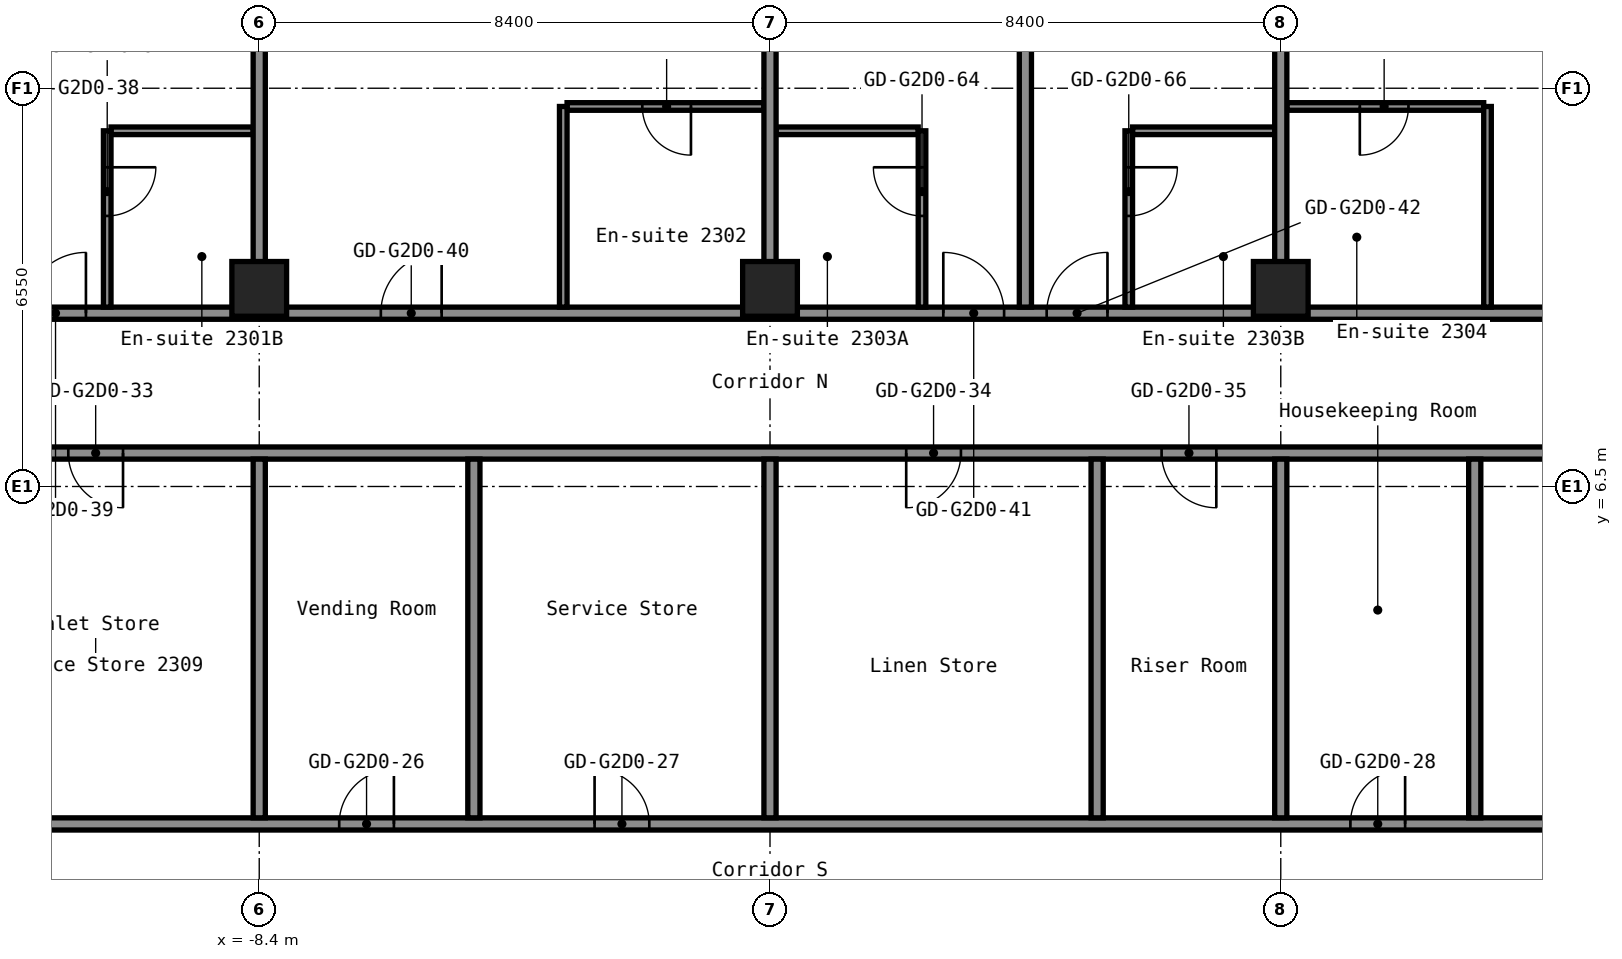
"""IFC4 building model, lengths in metres.
Left out: names, types, materials, properties, quantities, classifications, styles, units other than length and angle.
Written with IfcOpenShell. Run it as: python <this file> out.ifc"""

import sys

from ifc_helpers import new_model, si_unit, direction, frame, frame_2d, origin, origin_2d, place, context, subcontext, project, spatial, rectangle, hollow_rectangle, extrude, element, fill, save


model = new_model("IFC4")
c1 = context("Model", 3, precision=1e-05, world=origin(), true_north=direction((0.0, 1.0)))
c2 = subcontext(c1, "Body", "Model", "MODEL_VIEW")
j1 = project(units=[si_unit("LENGTHUNIT", "METRE"), si_unit("PLANEANGLEUNIT", "RADIAN")], contexts=[c1])
p1 = place(None, origin())
s1 = spatial("IfcSite", under=j1, at=p1, CompositionType="ELEMENT")
p2 = place(p1, origin())
s2 = spatial("IfcBuilding", under=s1, at=p2, CompositionType="ELEMENT")
p3 = place(p2, frame((0.0, 0.0, 85.0)))
s3 = spatial("IfcBuildingStorey", under=s2, at=p3, CompositionType="ELEMENT", Elevation=85.0)
for number, where, z_axis, x_axis in (
    (1, (-8.4, 9.75, 0.0), (0.0, 0.0, 1.0), (1.0, 0.0, 0.0)),
    (2, (0.0, 9.75, 0.0), (0.0, 0.0, 1.0), (1.0, 0.0, 0.0)),
    (3, (8.4, 9.75, 0.0), (0.0, 0.0, 1.0), (1.0, 0.0, 0.0)),
):
    element("IfcColumn", number, at=place(p3, frame(where, z_axis=z_axis, x_axis=x_axis)), inside=s3, PredefinedType="COLUMN", context=c2, shape_type="SweptSolid", body=[
        extrude(hollow_rectangle(XDim=0.9, YDim=0.9, WallThickness=0.036, at=origin_2d()), origin(), (0.0, 0.0, 1.0), 2.8),
    ])
p4 = place(p3, frame((-16.8, 0.95, 0.0), z_axis=(0.0, 0.0, 1.0), x_axis=(1.0, 0.0, 0.0)))
e4 = element("IfcWall", 4, at=p4, inside=s3, PredefinedType="PARTITIONING", context=c2, shape_type="SweptSolid", body=[
    extrude(rectangle(XDim=33.6, YDim=0.2, at=frame_2d((16.8, 0.0))), origin(), (0.0, 0.0, 1.0), 2.8),
])
p5 = place(p4, frame((9.715, 0.0, 0.0)))
e5 = element("IfcOpeningElement", 5, at=p5, cuts=e4, PredefinedType="OPENING", context=c2, shape_type="SweptSolid", body=[
    extrude(rectangle(XDim=0.9, YDim=2.1, at=frame_2d((0.45, 1.05))), frame((0.0, 0.11, 0.0), z_axis=(0.0, -1.0, 0.0), x_axis=(1.0, 0.0, 0.0)), (0.0, 0.0, 1.0), 0.22),
])
p6 = place(p4, frame((13.915, 0.0, 0.0)))
e6 = element("IfcOpeningElement", 6, at=p6, cuts=e4, PredefinedType="OPENING", context=c2, shape_type="SweptSolid", body=[
    extrude(rectangle(XDim=0.9, YDim=2.1, at=frame_2d((0.45, 1.05))), frame((0.0, 0.11, 0.0), z_axis=(0.0, -1.0, 0.0), x_axis=(1.0, 0.0, 0.0)), (0.0, 0.0, 1.0), 0.22),
])
p7 = place(p4, frame((26.345, 0.0, 0.0)))
e7 = element("IfcOpeningElement", 7, at=p7, cuts=e4, PredefinedType="OPENING", context=c2, shape_type="SweptSolid", body=[
    extrude(rectangle(XDim=0.9, YDim=2.1, at=frame_2d((0.45, 1.05))), frame((0.0, 0.11, 0.0), z_axis=(0.0, -1.0, 0.0), x_axis=(1.0, 0.0, 0.0)), (0.0, 0.0, 1.0), 0.22),
])
p8 = place(p4, frame((30.545, 0.0, 0.0)))
e8 = element("IfcOpeningElement", 8, at=p8, cuts=e4, PredefinedType="OPENING", context=c2, shape_type="SweptSolid", body=[
    extrude(rectangle(XDim=0.9, YDim=2.1, at=frame_2d((0.45, 1.05))), frame((0.0, 0.11, 0.0), z_axis=(0.0, -1.0, 0.0), x_axis=(1.0, 0.0, 0.0)), (0.0, 0.0, 1.0), 0.22),
])
p9 = place(p3, frame((-16.8, 7.05, 0.0), z_axis=(0.0, 0.0, 1.0), x_axis=(1.0, 0.0, 0.0)))
e9 = element("IfcWall", 9, at=p9, inside=s3, PredefinedType="PARTITIONING", context=c2, shape_type="SweptSolid", body=[
    extrude(rectangle(XDim=33.6, YDim=0.2, at=frame_2d((16.8, 0.0))), origin(), (0.0, 0.0, 1.0), 2.8),
])
p10 = place(p9, frame((1.06, 0.0, 0.0)))
e10 = element("IfcOpeningElement", 10, at=p10, cuts=e9, PredefinedType="OPENING", context=c2, shape_type="SweptSolid", body=[
    extrude(rectangle(XDim=0.9, YDim=2.1, at=frame_2d((0.45, 1.05))), frame((0.0, 0.11, 0.0), z_axis=(0.0, -1.0, 0.0), x_axis=(1.0, 0.0, 0.0)), (0.0, 0.0, 1.0), 0.22),
])
p11 = place(p9, frame((5.26, 0.0, 0.0)))
e11 = element("IfcOpeningElement", 11, at=p11, cuts=e9, PredefinedType="OPENING", context=c2, shape_type="SweptSolid", body=[
    extrude(rectangle(XDim=0.9, YDim=2.1, at=frame_2d((0.45, 1.05))), frame((0.0, 0.11, 0.0), z_axis=(0.0, -1.0, 0.0), x_axis=(1.0, 0.0, 0.0)), (0.0, 0.0, 1.0), 0.22),
])
p12 = place(p9, frame((19.04, 0.0, 0.0)))
e12 = element("IfcOpeningElement", 12, at=p12, cuts=e9, PredefinedType="OPENING", context=c2, shape_type="SweptSolid", body=[
    extrude(rectangle(XDim=0.9, YDim=2.1, at=frame_2d((0.45, 1.05))), frame((0.0, 0.11, 0.0), z_axis=(0.0, -1.0, 0.0), x_axis=(1.0, 0.0, 0.0)), (0.0, 0.0, 1.0), 0.22),
])
p13 = place(p9, frame((23.24, 0.0, 0.0)))
e13 = element("IfcOpeningElement", 13, at=p13, cuts=e9, PredefinedType="OPENING", context=c2, shape_type="SweptSolid", body=[
    extrude(rectangle(XDim=0.9, YDim=2.1, at=frame_2d((0.45, 1.05))), frame((0.0, 0.11, 0.0), z_axis=(0.0, -1.0, 0.0), x_axis=(1.0, 0.0, 0.0)), (0.0, 0.0, 1.0), 0.22),
])
p14 = place(p3, frame((-16.36, 9.35, 0.0), z_axis=(0.0, 0.0, 1.0), x_axis=(1.0, 0.0, 0.0)))
e14 = element("IfcWall", 14, at=p14, inside=s3, PredefinedType="PARTITIONING", context=c2, shape_type="SweptSolid", body=[
    extrude(rectangle(XDim=32.72, YDim=0.2, at=frame_2d((16.36, 0.0))), origin(), (0.0, 0.0, 1.0), 2.8),
])
p15 = place(p14, frame((2.41, 0.0, 0.0)))
e15 = element("IfcOpeningElement", 15, at=p15, cuts=e14, PredefinedType="OPENING", context=c2, shape_type="SweptSolid", body=[
    extrude(rectangle(XDim=1.0, YDim=2.1, at=frame_2d((0.5, 1.05))), frame((0.0, 0.11, 0.0), z_axis=(0.0, -1.0, 0.0), x_axis=(1.0, 0.0, 0.0)), (0.0, 0.0, 1.0), 0.22),
])
p16 = place(p14, frame((4.11, 0.0, 0.0)))
e16 = element("IfcOpeningElement", 16, at=p16, cuts=e14, PredefinedType="OPENING", context=c2, shape_type="SweptSolid", body=[
    extrude(rectangle(XDim=1.0, YDim=2.1, at=frame_2d((0.5, 1.05))), frame((0.0, 0.11, 0.0), z_axis=(0.0, -1.0, 0.0), x_axis=(1.0, 0.0, 0.0)), (0.0, 0.0, 1.0), 0.22),
])
p17 = place(p14, frame((9.96, 0.0, 0.0)))
e17 = element("IfcOpeningElement", 17, at=p17, cuts=e14, PredefinedType="OPENING", context=c2, shape_type="SweptSolid", body=[
    extrude(rectangle(XDim=1.0, YDim=2.1, at=frame_2d((0.5, 1.05))), frame((0.0, 0.11, 0.0), z_axis=(0.0, -1.0, 0.0), x_axis=(1.0, 0.0, 0.0)), (0.0, 0.0, 1.0), 0.22),
])
p18 = place(p14, frame((19.21, 0.0, 0.0)))
e18 = element("IfcOpeningElement", 18, at=p18, cuts=e14, PredefinedType="OPENING", context=c2, shape_type="SweptSolid", body=[
    extrude(rectangle(XDim=1.0, YDim=2.1, at=frame_2d((0.5, 1.05))), frame((0.0, 0.11, 0.0), z_axis=(0.0, -1.0, 0.0), x_axis=(1.0, 0.0, 0.0)), (0.0, 0.0, 1.0), 0.22),
])
p19 = place(p14, frame((20.91, 0.0, 0.0)))
e19 = element("IfcOpeningElement", 19, at=p19, cuts=e14, PredefinedType="OPENING", context=c2, shape_type="SweptSolid", body=[
    extrude(rectangle(XDim=1.0, YDim=2.1, at=frame_2d((0.5, 1.05))), frame((0.0, 0.11, 0.0), z_axis=(0.0, -1.0, 0.0), x_axis=(1.0, 0.0, 0.0)), (0.0, 0.0, 1.0), 0.22),
])
p20 = place(p14, frame((30.16, 0.0, 0.0)))
e20 = element("IfcOpeningElement", 20, at=p20, cuts=e14, PredefinedType="OPENING", context=c2, shape_type="SweptSolid", body=[
    extrude(rectangle(XDim=1.0, YDim=2.1, at=frame_2d((0.5, 1.05))), frame((0.0, 0.11, 0.0), z_axis=(0.0, -1.0, 0.0), x_axis=(1.0, 0.0, 0.0)), (0.0, 0.0, 1.0), 0.22),
])
for number, where, z_axis, x_axis in (
    (21, (-10.837, 12.35, 0.0), (0.0, 0.0, 1.0), (1.0, 0.0, 0.0)),
    (22, (0.1, 12.35, 0.0), (0.0, 0.0, 1.0), (1.0, 0.0, 0.0)),
):
    element("IfcWall", number, at=place(p3, frame(where, z_axis=z_axis, x_axis=x_axis)), inside=s3, PredefinedType="PARTITIONING", context=c2, shape_type="SweptSolid", body=[
        extrude(rectangle(XDim=2.337, YDim=0.125, at=frame_2d((1.169, 0.0))), origin(), (0.0, 0.0, 1.0), 2.8),
    ])
p21 = place(p3, frame((5.962, 12.35, 0.0), z_axis=(0.0, 0.0, 1.0), x_axis=(1.0, 0.0, 0.0)))
e23 = element("IfcWall", 23, at=p21, inside=s3, PredefinedType="PARTITIONING", context=c2, shape_type="SweptSolid", body=[
    extrude(rectangle(XDim=2.338, YDim=0.125, at=frame_2d((1.169, 0.0))), origin(), (0.0, 0.0, 1.0), 2.8),
])
p22 = place(p3, frame((-3.337, 12.75, 0.0), z_axis=(0.0, 0.0, 1.0), x_axis=(1.0, 0.0, 0.0)))
e24 = element("IfcWall", 24, at=p22, inside=s3, PredefinedType="PARTITIONING", context=c2, shape_type="SweptSolid", body=[
    extrude(rectangle(XDim=3.237, YDim=0.125, at=frame_2d((1.619, 0.0))), origin(), (0.0, 0.0, 1.0), 2.8),
])
p23 = place(p22, frame((1.238, 0.0, 0.0)))
e25 = element("IfcOpeningElement", 25, at=p23, cuts=e24, PredefinedType="OPENING", context=c2, shape_type="SweptSolid", body=[
    extrude(rectangle(XDim=0.8, YDim=2.1, at=frame_2d((0.4, 1.05))), frame((0.0, 0.073, 0.0), z_axis=(0.0, -1.0, 0.0), x_axis=(1.0, 0.0, 0.0)), (0.0, 0.0, 1.0), 0.145),
])
p24 = place(p3, frame((8.5, 12.75, 0.0), z_axis=(0.0, 0.0, 1.0), x_axis=(1.0, 0.0, 0.0)))
e26 = element("IfcWall", 26, at=p24, inside=s3, PredefinedType="PARTITIONING", context=c2, shape_type="SweptSolid", body=[
    extrude(rectangle(XDim=3.238, YDim=0.125, at=frame_2d((1.619, 0.0))), origin(), (0.0, 0.0, 1.0), 2.8),
])
p25 = place(p24, frame((1.2, 0.0, 0.0)))
e27 = element("IfcOpeningElement", 27, at=p25, cuts=e26, PredefinedType="OPENING", context=c2, shape_type="SweptSolid", body=[
    extrude(rectangle(XDim=0.8, YDim=2.1, at=frame_2d((0.4, 1.05))), frame((0.0, 0.073, 0.0), z_axis=(0.0, -1.0, 0.0), x_axis=(1.0, 0.0, 0.0)), (0.0, 0.0, 1.0), 0.145),
])
p26 = place(p3, frame((-10.9, 9.45, 0.0), z_axis=(0.0, 0.0, 1.0), x_axis=(0.0, 1.0, 0.0)))
e28 = element("IfcWall", 28, at=p26, inside=s3, PredefinedType="PARTITIONING", context=c2, shape_type="SweptSolid", body=[
    extrude(rectangle(XDim=2.9, YDim=0.125, at=frame_2d((1.45, 0.0))), origin(), (0.0, 0.0, 1.0), 2.8),
])
p27 = place(p26, frame((1.5, 0.0, 0.0)))
e29 = element("IfcOpeningElement", 29, at=p27, cuts=e28, PredefinedType="OPENING", context=c2, shape_type="SweptSolid", body=[
    extrude(rectangle(XDim=0.8, YDim=2.1, at=frame_2d((0.4, 1.05))), frame((0.0, 0.073, 0.0), z_axis=(0.0, -1.0, 0.0), x_axis=(1.0, 0.0, 0.0)), (0.0, 0.0, 1.0), 0.145),
])
p28 = place(p3, frame((-8.4, 1.05, 0.0), z_axis=(0.0, 0.0, 1.0), x_axis=(0.0, 1.0, 0.0)))
e30 = element("IfcWall", 30, at=p28, inside=s3, PredefinedType="PARTITIONING", context=c2, shape_type="SweptSolid", body=[
    extrude(rectangle(XDim=5.9, YDim=0.2, at=frame_2d((2.95, 0.0))), origin(), (0.0, 0.0, 1.0), 2.8),
])
p29 = place(p3, frame((-8.4, 10.19, 0.0), z_axis=(0.0, 0.0, 1.0), x_axis=(0.0, 1.0, 0.0)))
e31 = element("IfcWall", 31, at=p29, inside=s3, PredefinedType="PARTITIONING", context=c2, shape_type="SweptSolid", body=[
    extrude(rectangle(XDim=13.36, YDim=0.2, at=frame_2d((6.68, 0.0))), origin(), (0.0, 0.0, 1.0), 2.8),
])
p30 = place(p3, frame((-4.87, 1.05, 0.0), z_axis=(0.0, 0.0, 1.0), x_axis=(0.0, 1.0, 0.0)))
e32 = element("IfcWall", 32, at=p30, inside=s3, PredefinedType="PARTITIONING", context=c2, shape_type="SweptSolid", body=[
    extrude(rectangle(XDim=5.9, YDim=0.2, at=frame_2d((2.95, 0.0))), origin(), (0.0, 0.0, 1.0), 2.8),
])
p31 = place(p3, frame((-3.4, 9.45, 0.0), z_axis=(0.0, 0.0, 1.0), x_axis=(0.0, 1.0, 0.0)))
e33 = element("IfcWall", 33, at=p31, inside=s3, PredefinedType="PARTITIONING", context=c2, shape_type="SweptSolid", body=[
    extrude(rectangle(XDim=3.3, YDim=0.125, at=frame_2d((1.65, 0.0))), origin(), (0.0, 0.0, 1.0), 2.8),
])
p32 = place(p3, frame((0.0, 1.05, 0.0), z_axis=(0.0, 0.0, 1.0), x_axis=(0.0, 1.0, 0.0)))
e34 = element("IfcWall", 34, at=p32, inside=s3, PredefinedType="PARTITIONING", context=c2, shape_type="SweptSolid", body=[
    extrude(rectangle(XDim=5.9, YDim=0.2, at=frame_2d((2.95, 0.0))), origin(), (0.0, 0.0, 1.0), 2.8),
])
p33 = place(p3, frame((0.0, 10.19, 0.0), z_axis=(0.0, 0.0, 1.0), x_axis=(0.0, 1.0, 0.0)))
e35 = element("IfcWall", 35, at=p33, inside=s3, PredefinedType="PARTITIONING", context=c2, shape_type="SweptSolid", body=[
    extrude(rectangle(XDim=13.36, YDim=0.2, at=frame_2d((6.68, 0.0))), origin(), (0.0, 0.0, 1.0), 2.8),
])
p34 = place(p3, frame((2.5, 9.45, 0.0), z_axis=(0.0, 0.0, 1.0), x_axis=(0.0, 1.0, 0.0)))
e36 = element("IfcWall", 36, at=p34, inside=s3, PredefinedType="PARTITIONING", context=c2, shape_type="SweptSolid", body=[
    extrude(rectangle(XDim=2.9, YDim=0.125, at=frame_2d((1.45, 0.0))), origin(), (0.0, 0.0, 1.0), 2.8),
])
p35 = place(p34, frame((1.5, 0.0, 0.0)))
e37 = element("IfcOpeningElement", 37, at=p35, cuts=e36, PredefinedType="OPENING", context=c2, shape_type="SweptSolid", body=[
    extrude(rectangle(XDim=0.8, YDim=2.1, at=frame_2d((0.4, 1.05))), frame((0.0, 0.073, 0.0), z_axis=(0.0, -1.0, 0.0), x_axis=(1.0, 0.0, 0.0)), (0.0, 0.0, 1.0), 0.145),
])
p36 = place(p3, frame((4.2, 9.45, 0.0), z_axis=(0.0, 0.0, 1.0), x_axis=(0.0, 1.0, 0.0)))
e38 = element("IfcWall", 38, at=p36, inside=s3, PredefinedType="PARTITIONING", context=c2, shape_type="SweptSolid", body=[
    extrude(rectangle(XDim=14.1, YDim=0.2, at=frame_2d((7.05, 0.0))), origin(), (0.0, 0.0, 1.0), 2.8),
])
p37 = place(p3, frame((5.38, 1.05, 0.0), z_axis=(0.0, 0.0, 1.0), x_axis=(0.0, 1.0, 0.0)))
e39 = element("IfcWall", 39, at=p37, inside=s3, PredefinedType="PARTITIONING", context=c2, shape_type="SweptSolid", body=[
    extrude(rectangle(XDim=5.9, YDim=0.2, at=frame_2d((2.95, 0.0))), origin(), (0.0, 0.0, 1.0), 2.8),
])
p38 = place(p3, frame((5.9, 9.45, 0.0), z_axis=(0.0, 0.0, 1.0), x_axis=(0.0, 1.0, 0.0)))
e40 = element("IfcWall", 40, at=p38, inside=s3, PredefinedType="PARTITIONING", context=c2, shape_type="SweptSolid", body=[
    extrude(rectangle(XDim=2.9, YDim=0.125, at=frame_2d((1.45, 0.0))), origin(), (0.0, 0.0, 1.0), 2.8),
])
p39 = place(p38, frame((1.5, 0.0, 0.0)))
e41 = element("IfcOpeningElement", 41, at=p39, cuts=e40, PredefinedType="OPENING", context=c2, shape_type="SweptSolid", body=[
    extrude(rectangle(XDim=0.8, YDim=2.1, at=frame_2d((0.4, 1.05))), frame((0.0, 0.073, 0.0), z_axis=(0.0, -1.0, 0.0), x_axis=(1.0, 0.0, 0.0)), (0.0, 0.0, 1.0), 0.145),
])
p40 = place(p3, frame((8.4, 1.05, 0.0), z_axis=(0.0, 0.0, 1.0), x_axis=(0.0, 1.0, 0.0)))
e42 = element("IfcWall", 42, at=p40, inside=s3, PredefinedType="PARTITIONING", context=c2, shape_type="SweptSolid", body=[
    extrude(rectangle(XDim=5.9, YDim=0.2, at=frame_2d((2.95, 0.0))), origin(), (0.0, 0.0, 1.0), 2.8),
])
p41 = place(p3, frame((8.4, 10.19, 0.0), z_axis=(0.0, 0.0, 1.0), x_axis=(0.0, 1.0, 0.0)))
e43 = element("IfcWall", 43, at=p41, inside=s3, PredefinedType="PARTITIONING", context=c2, shape_type="SweptSolid", body=[
    extrude(rectangle(XDim=13.36, YDim=0.2, at=frame_2d((6.68, 0.0))), origin(), (0.0, 0.0, 1.0), 2.8),
])
p42 = place(p3, frame((11.59, 1.05, 0.0), z_axis=(0.0, 0.0, 1.0), x_axis=(0.0, 1.0, 0.0)))
e44 = element("IfcWall", 44, at=p42, inside=s3, PredefinedType="PARTITIONING", context=c2, shape_type="SweptSolid", body=[
    extrude(rectangle(XDim=5.9, YDim=0.2, at=frame_2d((2.95, 0.0))), origin(), (0.0, 0.0, 1.0), 2.8),
])
p43 = place(p3, frame((11.8, 9.45, 0.0), z_axis=(0.0, 0.0, 1.0), x_axis=(0.0, 1.0, 0.0)))
e45 = element("IfcWall", 45, at=p43, inside=s3, PredefinedType="PARTITIONING", context=c2, shape_type="SweptSolid", body=[
    extrude(rectangle(XDim=3.3, YDim=0.125, at=frame_2d((1.65, 0.0))), origin(), (0.0, 0.0, 1.0), 2.8),
])
p44 = place(p5, origin())
e46 = element("IfcDoor", 46, at=p44, inside=s3, OperationType="SINGLE_SWING_LEFT", PredefinedType="DOOR", context=c2, shape_type="SweptSolid", body=[
    extrude(rectangle(XDim=0.9, YDim=2.1, at=frame_2d((0.45, 1.05))), frame((0.0, 0.025, 0.0), z_axis=(0.0, -1.0, 0.0), x_axis=(1.0, 0.0, 0.0)), (0.0, 0.0, 1.0), 0.05),
])
fill(e5, e46)
p45 = place(p6, origin())
e47 = element("IfcDoor", 47, at=p45, inside=s3, OperationType="SINGLE_SWING_RIGHT", PredefinedType="DOOR", context=c2, shape_type="SweptSolid", body=[
    extrude(rectangle(XDim=0.9, YDim=2.1, at=frame_2d((0.45, 1.05))), frame((0.0, 0.025, 0.0), z_axis=(0.0, -1.0, 0.0), x_axis=(1.0, 0.0, 0.0)), (0.0, 0.0, 1.0), 0.05),
])
fill(e6, e47)
p46 = place(p7, origin())
e48 = element("IfcDoor", 48, at=p46, inside=s3, OperationType="SINGLE_SWING_LEFT", PredefinedType="DOOR", context=c2, shape_type="SweptSolid", body=[
    extrude(rectangle(XDim=0.9, YDim=2.1, at=frame_2d((0.45, 1.05))), frame((0.0, 0.025, 0.0), z_axis=(0.0, -1.0, 0.0), x_axis=(1.0, 0.0, 0.0)), (0.0, 0.0, 1.0), 0.05),
])
fill(e7, e48)
p47 = place(p11, origin())
e49 = element("IfcDoor", 49, at=p47, inside=s3, OperationType="SINGLE_SWING_RIGHT", PredefinedType="DOOR", context=c2, shape_type="SweptSolid", body=[
    extrude(rectangle(XDim=0.9, YDim=2.1, at=frame_2d((0.45, 1.05))), frame((0.0, 0.025, 0.0), z_axis=(0.0, -1.0, 0.0), x_axis=(1.0, 0.0, 0.0)), (0.0, 0.0, 1.0), 0.05),
])
fill(e11, e49)
p48 = place(p12, origin())
e50 = element("IfcDoor", 50, at=p48, inside=s3, OperationType="SINGLE_SWING_LEFT", PredefinedType="DOOR", context=c2, shape_type="SweptSolid", body=[
    extrude(rectangle(XDim=0.9, YDim=2.1, at=frame_2d((0.45, 1.05))), frame((0.0, 0.025, 0.0), z_axis=(0.0, -1.0, 0.0), x_axis=(1.0, 0.0, 0.0)), (0.0, 0.0, 1.0), 0.05),
])
fill(e12, e50)
p49 = place(p13, origin())
e51 = element("IfcDoor", 51, at=p49, inside=s3, OperationType="SINGLE_SWING_RIGHT", PredefinedType="DOOR", context=c2, shape_type="SweptSolid", body=[
    extrude(rectangle(XDim=0.9, YDim=2.1, at=frame_2d((0.45, 1.05))), frame((0.0, 0.025, 0.0), z_axis=(0.0, -1.0, 0.0), x_axis=(1.0, 0.0, 0.0)), (0.0, 0.0, 1.0), 0.05),
])
fill(e13, e51)
p50 = place(p16, origin())
e52 = element("IfcDoor", 52, at=p50, inside=s3, OperationType="SINGLE_SWING_LEFT", PredefinedType="DOOR", context=c2, shape_type="SweptSolid", body=[
    extrude(rectangle(XDim=1.0, YDim=2.1, at=frame_2d((0.5, 1.05))), frame((0.0, 0.025, 0.0), z_axis=(0.0, -1.0, 0.0), x_axis=(1.0, 0.0, 0.0)), (0.0, 0.0, 1.0), 0.05),
])
fill(e16, e52)
p51 = place(p17, origin())
e53 = element("IfcDoor", 53, at=p51, inside=s3, OperationType="SINGLE_SWING_LEFT", PredefinedType="DOOR", context=c2, shape_type="SweptSolid", body=[
    extrude(rectangle(XDim=1.0, YDim=2.1, at=frame_2d((0.5, 1.05))), frame((0.0, 0.025, 0.0), z_axis=(0.0, -1.0, 0.0), x_axis=(1.0, 0.0, 0.0)), (0.0, 0.0, 1.0), 0.05),
])
fill(e17, e53)
p52 = place(p18, origin())
e54 = element("IfcDoor", 54, at=p52, inside=s3, OperationType="SINGLE_SWING_RIGHT", PredefinedType="DOOR", context=c2, shape_type="SweptSolid", body=[
    extrude(rectangle(XDim=1.0, YDim=2.1, at=frame_2d((0.5, 1.05))), frame((0.0, 0.025, 0.0), z_axis=(0.0, -1.0, 0.0), x_axis=(1.0, 0.0, 0.0)), (0.0, 0.0, 1.0), 0.05),
])
fill(e18, e54)
p53 = place(p19, origin())
e55 = element("IfcDoor", 55, at=p53, inside=s3, OperationType="SINGLE_SWING_LEFT", PredefinedType="DOOR", context=c2, shape_type="SweptSolid", body=[
    extrude(rectangle(XDim=1.0, YDim=2.1, at=frame_2d((0.5, 1.05))), frame((0.0, 0.025, 0.0), z_axis=(0.0, -1.0, 0.0), x_axis=(1.0, 0.0, 0.0)), (0.0, 0.0, 1.0), 0.05),
])
fill(e19, e55)
p54 = place(p23, origin())
e56 = element("IfcDoor", 56, at=p54, inside=s3, OperationType="SINGLE_SWING_RIGHT", PredefinedType="DOOR", context=c2, shape_type="SweptSolid", body=[
    extrude(rectangle(XDim=0.8, YDim=2.1, at=frame_2d((0.4, 1.05))), frame((0.0, 0.025, 0.0), z_axis=(0.0, -1.0, 0.0), x_axis=(1.0, 0.0, 0.0)), (0.0, 0.0, 1.0), 0.05),
])
fill(e25, e56)
p55 = place(p25, origin())
e57 = element("IfcDoor", 57, at=p55, inside=s3, OperationType="SINGLE_SWING_LEFT", PredefinedType="DOOR", context=c2, shape_type="SweptSolid", body=[
    extrude(rectangle(XDim=0.8, YDim=2.1, at=frame_2d((0.4, 1.05))), frame((0.0, 0.025, 0.0), z_axis=(0.0, -1.0, 0.0), x_axis=(1.0, 0.0, 0.0)), (0.0, 0.0, 1.0), 0.05),
])
fill(e27, e57)
p56 = place(p27, origin())
e58 = element("IfcDoor", 58, at=p56, inside=s3, OperationType="SINGLE_SWING_RIGHT", PredefinedType="DOOR", context=c2, shape_type="SweptSolid", body=[
    extrude(rectangle(XDim=0.8, YDim=2.1, at=frame_2d((0.4, 1.05))), frame((0.0, 0.025, 0.0), z_axis=(0.0, -1.0, 0.0), x_axis=(1.0, 0.0, 0.0)), (0.0, 0.0, 1.0), 0.05),
])
fill(e29, e58)
p57 = place(p35, origin())
e59 = element("IfcDoor", 59, at=p57, inside=s3, OperationType="SINGLE_SWING_LEFT", PredefinedType="DOOR", context=c2, shape_type="SweptSolid", body=[
    extrude(rectangle(XDim=0.8, YDim=2.1, at=frame_2d((0.4, 1.05))), frame((0.0, 0.025, 0.0), z_axis=(0.0, -1.0, 0.0), x_axis=(1.0, 0.0, 0.0)), (0.0, 0.0, 1.0), 0.05),
])
fill(e37, e59)
p58 = place(p39, origin())
e60 = element("IfcDoor", 60, at=p58, inside=s3, OperationType="SINGLE_SWING_RIGHT", PredefinedType="DOOR", context=c2, shape_type="SweptSolid", body=[
    extrude(rectangle(XDim=0.8, YDim=2.1, at=frame_2d((0.4, 1.05))), frame((0.0, 0.025, 0.0), z_axis=(0.0, -1.0, 0.0), x_axis=(1.0, 0.0, 0.0)), (0.0, 0.0, 1.0), 0.05),
])
fill(e41, e60)
save(model, sys.argv[1])
